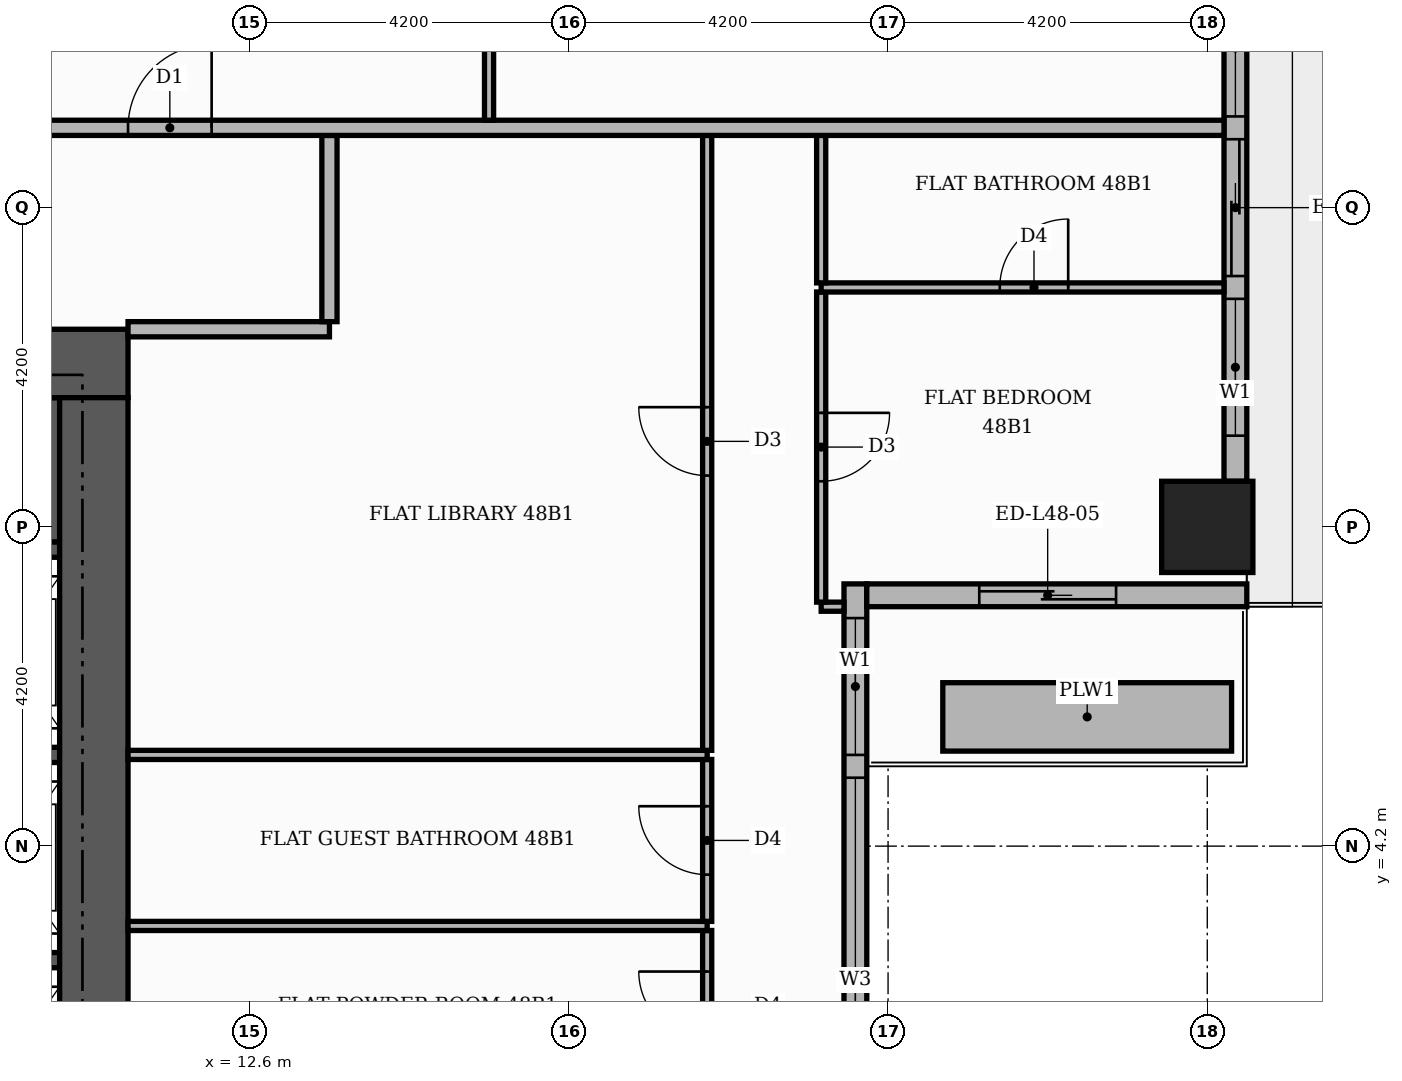
"""IFC4 building model, lengths in metres.
Left out: names, types, materials, properties, quantities, classifications, styles, units other than length and angle.
Written with IfcOpenShell. Run it as: python <this file> out.ifc"""

import sys

from ifc_helpers import new_model, si_unit, direction, frame, frame_2d, origin, origin_2d, place, context, subcontext, project, spatial, rectangle, extrude, element, fill, save


model = new_model("IFC4")
c1 = context("Model", 3, precision=1e-05, world=origin(), true_north=direction((0.0, 1.0)))
c2 = subcontext(c1, "Body", "Model", "MODEL_VIEW")
j1 = project(units=[si_unit("LENGTHUNIT", "METRE"), si_unit("PLANEANGLEUNIT", "RADIAN")], contexts=[c1])
p1 = place(None, origin())
s1 = spatial("IfcSite", under=j1, at=p1, CompositionType="ELEMENT")
p2 = place(p1, origin())
s2 = spatial("IfcBuilding", under=s1, at=p2, CompositionType="ELEMENT")
p3 = place(p2, frame((0.0, 0.0, 204.0)))
s3 = spatial("IfcBuildingStorey", under=s2, at=p3, CompositionType="ELEMENT", Elevation=204.0)
p4 = place(p3, frame((5.5, 9.15, 0.0), z_axis=(0.0, 0.0, 1.0), x_axis=(1.0, 0.0, 0.0)))
e1 = element("IfcWall", 1, at=p4, inside=s3, PredefinedType="SHEAR", context=c2, shape_type="SweptSolid", body=[
    extrude(rectangle(XDim=4.6, YDim=1.9, at=frame_2d((2.3, 0.0))), origin(), (0.0, 0.0, 1.0), 3.48),
])
for number, where, z_axis, x_axis in (
    (2, (8.1, 2.7, 0.0), (0.0, 0.0, 1.0), (1.0, 0.0, 0.0)),
    (3, (8.1, 5.4, 0.0), (0.0, 0.0, 1.0), (1.0, 0.0, 0.0)),
    (4, (8.1, 8.1, 0.0), (0.0, 0.0, 1.0), (1.0, 0.0, 0.0)),
):
    element("IfcWall", number, at=place(p3, frame(where, z_axis=z_axis, x_axis=x_axis)), inside=s3, PredefinedType="SHEAR", context=c2, shape_type="SweptSolid", body=[
        extrude(rectangle(XDim=2.0, YDim=0.2, at=frame_2d((1.0, 0.0))), origin(), (0.0, 0.0, 1.0), 3.48),
    ])
p5 = place(p3, frame((-11.0, 10.55, 0.0), z_axis=(0.0, 0.0, 1.0), x_axis=(1.0, 0.0, 0.0)))
e5 = element("IfcWall", 5, at=p5, inside=s3, PredefinedType="SHEAR", context=c2, shape_type="SweptSolid", body=[
    extrude(rectangle(XDim=22.0, YDim=0.9, at=frame_2d((11.0, 0.0))), origin(), (0.0, 0.0, 1.0), 3.48),
])
p6 = place(p5, frame((13.3, 0.0, 0.0)))
e6 = element("IfcOpeningElement", 6, at=p6, cuts=e5, PredefinedType="OPENING", context=c2, shape_type="SweptSolid", body=[
    extrude(rectangle(XDim=1.8, YDim=2.2, at=frame_2d((0.9, 1.1))), frame((0.0, 0.46, 0.0), z_axis=(0.0, -1.0, 0.0), x_axis=(1.0, 0.0, 0.0)), (0.0, 0.0, 1.0), 0.92),
])
p7 = place(p3, frame((10.55, -10.1, 0.0), z_axis=(0.0, 0.0, 1.0), x_axis=(0.0, 1.0, 0.0)))
e7 = element("IfcWall", 7, at=p7, inside=s3, PredefinedType="SHEAR", context=c2, shape_type="SweptSolid", body=[
    extrude(rectangle(XDim=20.2, YDim=0.9, at=frame_2d((10.1, 0.0))), origin(), (0.0, 0.0, 1.0), 3.48),
])
p8 = place(p3, frame((25.2, 8.4, 0.0), z_axis=(0.0, 0.0, 1.0), x_axis=(1.0, 0.0, 0.0)))
e8 = element("IfcColumn", 8, at=p8, inside=s3, PredefinedType="COLUMN", context=c2, shape_type="SweptSolid", body=[
    extrude(rectangle(XDim=1.2, YDim=1.2, at=origin_2d()), origin(), (0.0, 0.0, 1.0), 3.9),
])
p9 = place(p3, frame((20.57, -7.35, 0.0), z_axis=(0.0, 0.0, 1.0), x_axis=(0.0, 1.0, 0.0)))
e9 = element("IfcWall", 9, at=p9, inside=s3, PredefinedType="STANDARD", context=c2, shape_type="SweptSolid", body=[
    extrude(rectangle(XDim=15.0, YDim=0.3, at=frame_2d((7.5, 0.0))), origin(), (0.0, 0.0, 1.0), 3.48),
])
p10 = place(p9, frame((0.15, 0.0, 0.9)))
e10 = element("IfcOpeningElement", 10, at=p10, cuts=e9, PredefinedType="OPENING", context=c2, shape_type="SweptSolid", body=[
    extrude(rectangle(XDim=6.0, YDim=2.1, at=frame_2d((3.0, 1.05))), frame((0.0, 0.16, 0.0), z_axis=(0.0, -1.0, 0.0), x_axis=(1.0, 0.0, 0.0)), (0.0, 0.0, 1.0), 0.32),
])
p11 = place(p9, frame((6.45, 0.0, 0.9)))
e11 = element("IfcOpeningElement", 11, at=p11, cuts=e9, PredefinedType="OPENING", context=c2, shape_type="SweptSolid", body=[
    extrude(rectangle(XDim=6.0, YDim=2.1, at=frame_2d((3.0, 1.05))), frame((0.0, 0.16, 0.0), z_axis=(0.0, -1.0, 0.0), x_axis=(1.0, 0.0, 0.0)), (0.0, 0.0, 1.0), 0.32),
])
p12 = place(p9, frame((12.75, 0.0, 0.9)))
e12 = element("IfcOpeningElement", 12, at=p12, cuts=e9, PredefinedType="OPENING", context=c2, shape_type="SweptSolid", body=[
    extrude(rectangle(XDim=1.8, YDim=2.1, at=frame_2d((0.9, 1.05))), frame((0.0, 0.16, 0.0), z_axis=(0.0, -1.0, 0.0), x_axis=(1.0, 0.0, 0.0)), (0.0, 0.0, 1.0), 0.32),
])
p13 = place(p3, frame((20.72, 7.5, 0.0), z_axis=(0.0, 0.0, 1.0), x_axis=(1.0, 0.0, 0.0)))
e13 = element("IfcWall", 13, at=p13, inside=s3, PredefinedType="STANDARD", context=c2, shape_type="SweptSolid", body=[
    extrude(rectangle(XDim=5.0, YDim=0.3, at=frame_2d((2.5, 0.0))), origin(), (0.0, 0.0, 1.0), 3.48),
])
p14 = place(p13, frame((1.48, 0.0, 0.0)))
e14 = element("IfcOpeningElement", 14, at=p14, cuts=e13, PredefinedType="OPENING", context=c2, shape_type="SweptSolid", body=[
    extrude(rectangle(XDim=1.8, YDim=2.4, at=frame_2d((0.9, 1.2))), frame((0.0, 0.16, 0.0), z_axis=(0.0, -1.0, 0.0), x_axis=(1.0, 0.0, 0.0)), (0.0, 0.0, 1.0), 0.32),
])
p15 = place(p3, frame((25.57, 9.0, 0.0), z_axis=(0.0, 0.0, 1.0), x_axis=(0.0, 1.0, 0.0)))
e15 = element("IfcWall", 15, at=p15, inside=s3, PredefinedType="STANDARD", context=c2, shape_type="SweptSolid", body=[
    extrude(rectangle(XDim=7.2, YDim=0.3, at=frame_2d((3.6, 0.0))), origin(), (0.0, 0.0, 1.0), 3.48),
])
p16 = place(p15, frame((0.6, 0.0, 0.9)))
e16 = element("IfcOpeningElement", 16, at=p16, cuts=e15, PredefinedType="OPENING", context=c2, shape_type="SweptSolid", body=[
    extrude(rectangle(XDim=1.8, YDim=2.1, at=frame_2d((0.9, 1.05))), frame((0.0, 0.16, 0.0), z_axis=(0.0, -1.0, 0.0), x_axis=(1.0, 0.0, 0.0)), (0.0, 0.0, 1.0), 0.32),
])
p17 = place(p15, frame((2.7, 0.0, 0.0)))
e17 = element("IfcOpeningElement", 17, at=p17, cuts=e15, PredefinedType="OPENING", context=c2, shape_type="SweptSolid", body=[
    extrude(rectangle(XDim=1.8, YDim=2.4, at=frame_2d((0.9, 1.2))), frame((0.0, 0.16, 0.0), z_axis=(0.0, -1.0, 0.0), x_axis=(1.0, 0.0, 0.0)), (0.0, 0.0, 1.0), 0.32),
])
p18 = place(p15, frame((4.8, 0.0, 0.9)))
e18 = element("IfcOpeningElement", 18, at=p18, cuts=e15, PredefinedType="OPENING", context=c2, shape_type="SweptSolid", body=[
    extrude(rectangle(XDim=1.8, YDim=2.1, at=frame_2d((0.9, 1.05))), frame((0.0, 0.16, 0.0), z_axis=(0.0, -1.0, 0.0), x_axis=(1.0, 0.0, 0.0)), (0.0, 0.0, 1.0), 0.32),
])
p19 = place(p3, frame((21.72, 5.9, 0.0), z_axis=(0.0, 0.0, 1.0), x_axis=(1.0, 0.0, 0.0)))
e19 = element("IfcWall", 19, at=p19, inside=s3, PredefinedType="MOVABLE", context=c2, shape_type="SweptSolid", body=[
    extrude(rectangle(XDim=3.8, YDim=0.9, at=frame_2d((1.9, 0.0))), origin(), (0.0, 0.0, 1.0), 0.6),
])
p20 = place(p3, frame((18.62, 1.11, 0.0), z_axis=(0.0, 0.0, 1.0), x_axis=(0.0, 1.0, 0.0)))
e20 = element("IfcWall", 20, at=p20, inside=s3, PredefinedType="PARTITIONING", context=c2, shape_type="SweptSolid", body=[
    extrude(rectangle(XDim=1.98, YDim=0.12, at=frame_2d((0.99, 0.0))), origin(), (0.0, 0.0, 1.0), 3.48),
])
p21 = place(p20, frame((0.54, 0.0, 0.0)))
e21 = element("IfcOpeningElement", 21, at=p21, cuts=e20, PredefinedType="OPENING", context=c2, shape_type="SweptSolid", body=[
    extrude(rectangle(XDim=0.9, YDim=2.1, at=frame_2d((0.45, 1.05))), frame((0.0, 0.07, 0.0), z_axis=(0.0, -1.0, 0.0), x_axis=(1.0, 0.0, 0.0)), (0.0, 0.0, 1.0), 0.14),
])
p22 = place(p3, frame((11.0, 3.15, 0.0), z_axis=(0.0, 0.0, 1.0), x_axis=(1.0, 0.0, 0.0)))
e22 = element("IfcWall", 22, at=p22, inside=s3, PredefinedType="PARTITIONING", context=c2, shape_type="SweptSolid", body=[
    extrude(rectangle(XDim=7.62, YDim=0.12, at=frame_2d((3.81, 0.0))), origin(), (0.0, 0.0, 1.0), 3.48),
])
p23 = place(p3, frame((18.62, 3.21, 0.0), z_axis=(0.0, 0.0, 1.0), x_axis=(0.0, 1.0, 0.0)))
e23 = element("IfcWall", 23, at=p23, inside=s3, PredefinedType="PARTITIONING", context=c2, shape_type="SweptSolid", body=[
    extrude(rectangle(XDim=2.13, YDim=0.12, at=frame_2d((1.065, 0.0))), origin(), (0.0, 0.0, 1.0), 3.48),
])
p24 = place(p23, frame((0.615, 0.0, 0.0)))
e24 = element("IfcOpeningElement", 24, at=p24, cuts=e23, PredefinedType="OPENING", context=c2, shape_type="SweptSolid", body=[
    extrude(rectangle(XDim=0.9, YDim=2.1, at=frame_2d((0.45, 1.05))), frame((0.0, 0.07, 0.0), z_axis=(0.0, -1.0, 0.0), x_axis=(1.0, 0.0, 0.0)), (0.0, 0.0, 1.0), 0.14),
])
p25 = place(p3, frame((11.0, 5.4, 0.0), z_axis=(0.0, 0.0, 1.0), x_axis=(1.0, 0.0, 0.0)))
e25 = element("IfcWall", 25, at=p25, inside=s3, PredefinedType="PARTITIONING", context=c2, shape_type="SweptSolid", body=[
    extrude(rectangle(XDim=7.62, YDim=0.12, at=frame_2d((3.81, 0.0))), origin(), (0.0, 0.0, 1.0), 3.48),
])
p26 = place(p3, frame((18.62, 5.46, 0.0), z_axis=(0.0, 0.0, 1.0), x_axis=(0.0, 1.0, 0.0)))
e26 = element("IfcWall", 26, at=p26, inside=s3, PredefinedType="PARTITIONING", context=c2, shape_type="SweptSolid", body=[
    extrude(rectangle(XDim=8.09, YDim=0.12, at=frame_2d((4.045, 0.0))), origin(), (0.0, 0.0, 1.0), 3.48),
])
p27 = place(p26, frame((3.615, 0.0, 0.0)))
e27 = element("IfcOpeningElement", 27, at=p27, cuts=e26, PredefinedType="OPENING", context=c2, shape_type="SweptSolid", body=[
    extrude(rectangle(XDim=0.9, YDim=2.1, at=frame_2d((0.45, 1.05))), frame((0.0, 0.07, 0.0), z_axis=(0.0, -1.0, 0.0), x_axis=(1.0, 0.0, 0.0)), (0.0, 0.0, 1.0), 0.14),
])
p28 = place(p3, frame((20.12, 7.35, 0.0), z_axis=(0.0, 0.0, 1.0), x_axis=(1.0, 0.0, 0.0)))
e28 = element("IfcWall", 28, at=p28, inside=s3, PredefinedType="PARTITIONING", context=c2, shape_type="SweptSolid", body=[
    extrude(rectangle(XDim=0.3, YDim=0.12, at=frame_2d((0.15, 0.0))), origin(), (0.0, 0.0, 1.0), 3.48),
])
p29 = place(p3, frame((20.12, 7.41, 0.0), z_axis=(0.0, 0.0, 1.0), x_axis=(0.0, 1.0, 0.0)))
e29 = element("IfcWall", 29, at=p29, inside=s3, PredefinedType="PARTITIONING", context=c2, shape_type="SweptSolid", body=[
    extrude(rectangle(XDim=4.08, YDim=0.12, at=frame_2d((2.04, 0.0))), origin(), (0.0, 0.0, 1.0), 3.48),
])
p30 = place(p29, frame((1.59, 0.0, 0.0)))
e30 = element("IfcOpeningElement", 30, at=p30, cuts=e29, PredefinedType="OPENING", context=c2, shape_type="SweptSolid", body=[
    extrude(rectangle(XDim=0.9, YDim=2.1, at=frame_2d((0.45, 1.05))), frame((0.0, 0.07, 0.0), z_axis=(0.0, -1.0, 0.0), x_axis=(1.0, 0.0, 0.0)), (0.0, 0.0, 1.0), 0.14),
])
p31 = place(p3, frame((11.0, 11.0, 0.0), z_axis=(0.0, 0.0, 1.0), x_axis=(1.0, 0.0, 0.0)))
e31 = element("IfcWall", 31, at=p31, inside=s3, PredefinedType="PARTITIONING", context=c2, shape_type="SweptSolid", body=[
    extrude(rectangle(XDim=2.65, YDim=0.2, at=frame_2d((1.325, 0.0))), origin(), (0.0, 0.0, 1.0), 3.48),
])
p32 = place(p3, frame((13.65, 11.1, 0.0), z_axis=(0.0, 0.0, 1.0), x_axis=(0.0, 1.0, 0.0)))
e32 = element("IfcWall", 32, at=p32, inside=s3, PredefinedType="PARTITIONING", context=c2, shape_type="SweptSolid", body=[
    extrude(rectangle(XDim=2.45, YDim=0.2, at=frame_2d((1.225, 0.0))), origin(), (0.0, 0.0, 1.0), 3.48),
])
p33 = place(p3, frame((20.12, 11.55, 0.0), z_axis=(0.0, 0.0, 1.0), x_axis=(1.0, 0.0, 0.0)))
e33 = element("IfcWall", 33, at=p33, inside=s3, PredefinedType="PARTITIONING", context=c2, shape_type="SweptSolid", body=[
    extrude(rectangle(XDim=5.3, YDim=0.12, at=frame_2d((2.65, 0.0))), origin(), (0.0, 0.0, 1.0), 3.48),
])
p34 = place(p33, frame((2.35, 0.0, 0.0)))
e34 = element("IfcOpeningElement", 34, at=p34, cuts=e33, PredefinedType="OPENING", context=c2, shape_type="SweptSolid", body=[
    extrude(rectangle(XDim=0.9, YDim=2.1, at=frame_2d((0.45, 1.05))), frame((0.0, 0.07, 0.0), z_axis=(0.0, -1.0, 0.0), x_axis=(1.0, 0.0, 0.0)), (0.0, 0.0, 1.0), 0.14),
])
p35 = place(p3, frame((20.12, 11.61, 0.0), z_axis=(0.0, 0.0, 1.0), x_axis=(0.0, 1.0, 0.0)))
e35 = element("IfcWall", 35, at=p35, inside=s3, PredefinedType="PARTITIONING", context=c2, shape_type="SweptSolid", body=[
    extrude(rectangle(XDim=1.94, YDim=0.12, at=frame_2d((0.97, 0.0))), origin(), (0.0, 0.0, 1.0), 3.48),
])
p36 = place(p3, frame((-13.65, 13.65, 0.0), z_axis=(0.0, 0.0, 1.0), x_axis=(1.0, 0.0, 0.0)))
e36 = element("IfcWall", 36, at=p36, inside=s3, PredefinedType="PARTITIONING", context=c2, shape_type="SweptSolid", body=[
    extrude(rectangle(XDim=39.07, YDim=0.2, at=frame_2d((19.535, 0.0))), origin(), (0.0, 0.0, 1.0), 3.48),
])
p37 = place(p36, frame((24.65, 0.0, 0.0)))
e37 = element("IfcOpeningElement", 37, at=p37, cuts=e36, PredefinedType="OPENING", context=c2, shape_type="SweptSolid", body=[
    extrude(rectangle(XDim=1.1, YDim=2.4, at=frame_2d((0.55, 1.2))), frame((0.0, 0.11, 0.0), z_axis=(0.0, -1.0, 0.0), x_axis=(1.0, 0.0, 0.0)), (0.0, 0.0, 1.0), 0.22),
])
p38 = place(p36, frame((16.25, 0.0, 0.0)))
e38 = element("IfcOpeningElement", 38, at=p38, cuts=e36, PredefinedType="OPENING", context=c2, shape_type="SweptSolid", body=[
    extrude(rectangle(XDim=1.1, YDim=2.4, at=frame_2d((0.55, 1.2))), frame((0.0, 0.11, 0.0), z_axis=(0.0, -1.0, 0.0), x_axis=(1.0, 0.0, 0.0)), (0.0, 0.0, 1.0), 0.22),
])
p39 = place(p3, frame((15.75, 13.75, 0.0), z_axis=(0.0, 0.0, 1.0), x_axis=(0.0, 1.0, 0.0)))
e39 = element("IfcWall", 39, at=p39, inside=s3, PredefinedType="PARTITIONING", context=c2, shape_type="SweptSolid", body=[
    extrude(rectangle(XDim=6.01, YDim=0.12, at=frame_2d((3.005, 0.0))), origin(), (0.0, 0.0, 1.0), 3.48),
])
p40 = place(p39, frame((2.485, 0.0, 0.0)))
e40 = element("IfcOpeningElement", 40, at=p40, cuts=e39, PredefinedType="OPENING", context=c2, shape_type="SweptSolid", body=[
    extrude(rectangle(XDim=1.0, YDim=2.1, at=frame_2d((0.5, 1.05))), frame((0.0, 0.07, 0.0), z_axis=(0.0, -1.0, 0.0), x_axis=(1.0, 0.0, 0.0)), (0.0, 0.0, 1.0), 0.14),
])
p41 = place(p11, origin())
e41 = element("IfcWindow", 41, at=p41, inside=s3, PartitioningType="SINGLE_PANEL", PredefinedType="WINDOW", context=c2, shape_type="SweptSolid", body=[
    extrude(rectangle(XDim=6.0, YDim=2.1, at=frame_2d((3.0, 1.05))), frame((0.0, 0.03, 0.0), z_axis=(0.0, -1.0, 0.0), x_axis=(1.0, 0.0, 0.0)), (0.0, 0.0, 1.0), 0.06),
])
fill(e11, e41)
p42 = place(p12, origin())
e42 = element("IfcWindow", 42, at=p42, inside=s3, PartitioningType="SINGLE_PANEL", PredefinedType="WINDOW", context=c2, shape_type="SweptSolid", body=[
    extrude(rectangle(XDim=1.8, YDim=2.1, at=frame_2d((0.9, 1.05))), frame((0.0, 0.03, 0.0), z_axis=(0.0, -1.0, 0.0), x_axis=(1.0, 0.0, 0.0)), (0.0, 0.0, 1.0), 0.06),
])
fill(e12, e42)
p43 = place(p14, origin())
e43 = element("IfcDoor", 43, at=p43, inside=s3, OperationType="SLIDING_TO_RIGHT", PredefinedType="DOOR", context=c2, shape_type="SweptSolid", body=[
    extrude(rectangle(XDim=1.8, YDim=2.4, at=frame_2d((0.9, 1.2))), frame((0.0, 0.025, 0.0), z_axis=(0.0, -1.0, 0.0), x_axis=(1.0, 0.0, 0.0)), (0.0, 0.0, 1.0), 0.05),
])
fill(e14, e43)
p44 = place(p16, origin())
e44 = element("IfcWindow", 44, at=p44, inside=s3, PartitioningType="SINGLE_PANEL", PredefinedType="WINDOW", context=c2, shape_type="SweptSolid", body=[
    extrude(rectangle(XDim=1.8, YDim=2.1, at=frame_2d((0.9, 1.05))), frame((0.0, 0.03, 0.0), z_axis=(0.0, -1.0, 0.0), x_axis=(1.0, 0.0, 0.0)), (0.0, 0.0, 1.0), 0.06),
])
fill(e16, e44)
p45 = place(p17, origin())
e45 = element("IfcDoor", 45, at=p45, inside=s3, OperationType="SLIDING_TO_RIGHT", PredefinedType="DOOR", context=c2, shape_type="SweptSolid", body=[
    extrude(rectangle(XDim=1.8, YDim=2.4, at=frame_2d((0.9, 1.2))), frame((0.0, 0.025, 0.0), z_axis=(0.0, -1.0, 0.0), x_axis=(1.0, 0.0, 0.0)), (0.0, 0.0, 1.0), 0.05),
])
fill(e17, e45)
p46 = place(p18, origin())
e46 = element("IfcWindow", 46, at=p46, inside=s3, PartitioningType="SINGLE_PANEL", PredefinedType="WINDOW", context=c2, shape_type="SweptSolid", body=[
    extrude(rectangle(XDim=1.8, YDim=2.1, at=frame_2d((0.9, 1.05))), frame((0.0, 0.03, 0.0), z_axis=(0.0, -1.0, 0.0), x_axis=(1.0, 0.0, 0.0)), (0.0, 0.0, 1.0), 0.06),
])
fill(e18, e46)
p47 = place(p21, origin())
e47 = element("IfcDoor", 47, at=p47, inside=s3, OperationType="SINGLE_SWING_RIGHT", PredefinedType="DOOR", context=c2, shape_type="SweptSolid", body=[
    extrude(rectangle(XDim=0.9, YDim=2.1, at=frame_2d((0.45, 1.05))), frame((0.0, 0.025, 0.0), z_axis=(0.0, -1.0, 0.0), x_axis=(1.0, 0.0, 0.0)), (0.0, 0.0, 1.0), 0.05),
])
fill(e21, e47)
p48 = place(p24, origin())
e48 = element("IfcDoor", 48, at=p48, inside=s3, OperationType="SINGLE_SWING_RIGHT", PredefinedType="DOOR", context=c2, shape_type="SweptSolid", body=[
    extrude(rectangle(XDim=0.9, YDim=2.1, at=frame_2d((0.45, 1.05))), frame((0.0, 0.025, 0.0), z_axis=(0.0, -1.0, 0.0), x_axis=(1.0, 0.0, 0.0)), (0.0, 0.0, 1.0), 0.05),
])
fill(e24, e48)
p49 = place(p27, origin())
e49 = element("IfcDoor", 49, at=p49, inside=s3, OperationType="SINGLE_SWING_RIGHT", PredefinedType="DOOR", context=c2, shape_type="SweptSolid", body=[
    extrude(rectangle(XDim=0.9, YDim=2.1, at=frame_2d((0.45, 1.05))), frame((0.0, 0.025, 0.0), z_axis=(0.0, -1.0, 0.0), x_axis=(1.0, 0.0, 0.0)), (0.0, 0.0, 1.0), 0.05),
])
fill(e27, e49)
p50 = place(p30, frame((0.9, 0.0, 0.0), z_axis=(0.0, 0.0, 1.0), x_axis=(-1.0, 0.0, 0.0)))
e50 = element("IfcDoor", 50, at=p50, inside=s3, OperationType="SINGLE_SWING_RIGHT", PredefinedType="DOOR", context=c2, shape_type="SweptSolid", body=[
    extrude(rectangle(XDim=0.9, YDim=2.1, at=frame_2d((0.45, 1.05))), frame((0.0, 0.025, 0.0), z_axis=(0.0, -1.0, 0.0), x_axis=(1.0, 0.0, 0.0)), (0.0, 0.0, 1.0), 0.05),
])
fill(e30, e50)
p51 = place(p34, origin())
e51 = element("IfcDoor", 51, at=p51, inside=s3, OperationType="SINGLE_SWING_RIGHT", PredefinedType="DOOR", context=c2, shape_type="SweptSolid", body=[
    extrude(rectangle(XDim=0.9, YDim=2.1, at=frame_2d((0.45, 1.05))), frame((0.0, 0.025, 0.0), z_axis=(0.0, -1.0, 0.0), x_axis=(1.0, 0.0, 0.0)), (0.0, 0.0, 1.0), 0.05),
])
fill(e34, e51)
p52 = place(p37, origin())
e52 = element("IfcDoor", 52, at=p52, inside=s3, OperationType="SINGLE_SWING_RIGHT", PredefinedType="DOOR", context=c2, shape_type="SweptSolid", body=[
    extrude(rectangle(XDim=1.1, YDim=2.4, at=frame_2d((0.55, 1.2))), frame((0.0, 0.025, 0.0), z_axis=(0.0, -1.0, 0.0), x_axis=(1.0, 0.0, 0.0)), (0.0, 0.0, 1.0), 0.05),
])
fill(e37, e52)
save(model, sys.argv[1])
